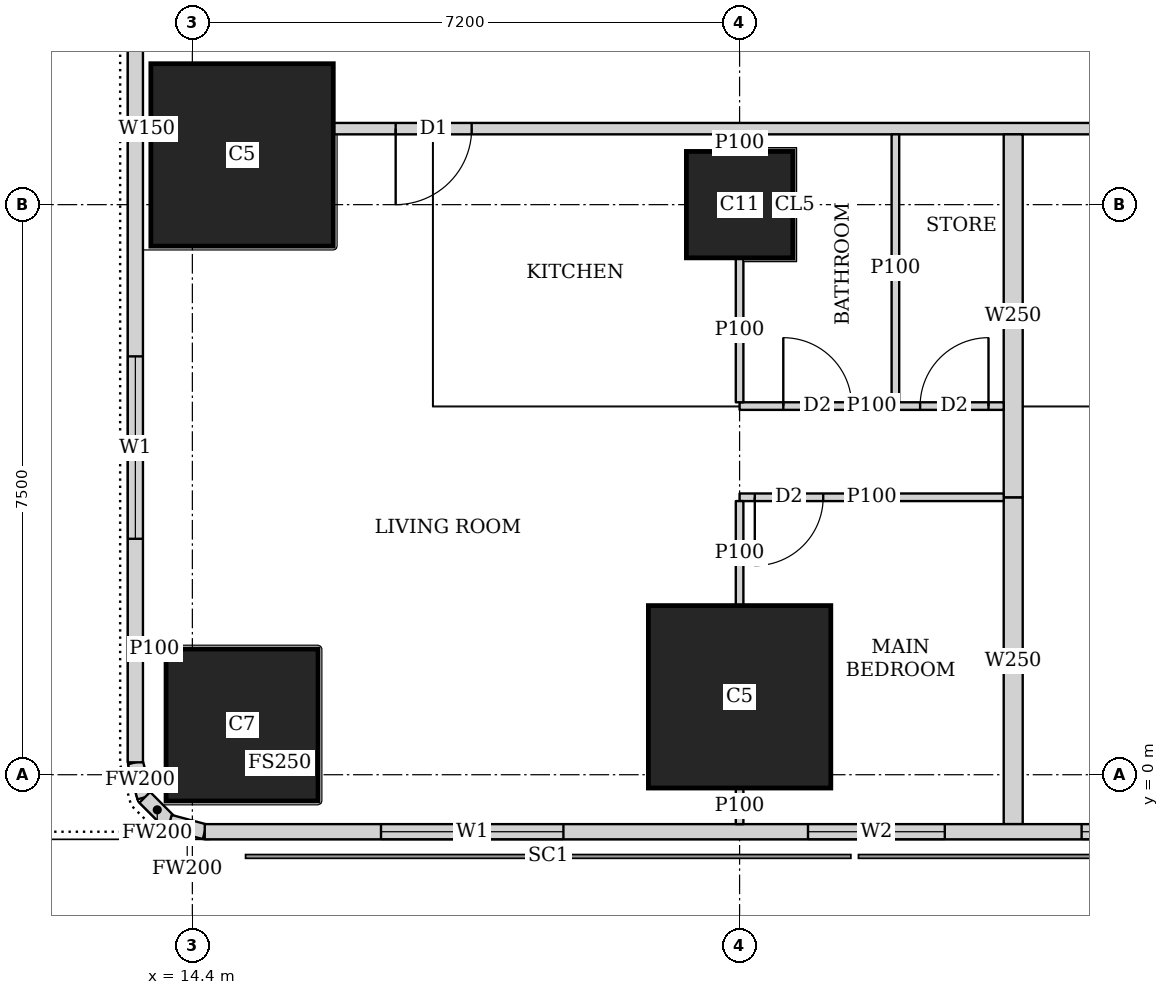
"""IFC4 building model, lengths in metres.
Left out: names, types, materials, properties, quantities, classifications, styles, units other than length and angle.
Written with IfcOpenShell. Run it as: python <this file> out.ifc"""

import sys

from ifc_helpers import new_model, si_unit, direction, frame, frame_2d, origin, origin_2d, place, context, subcontext, project, spatial, rectangle, extrude, element, fill, save


model = new_model("IFC4")
c1 = context("Model", 3, precision=1e-05, world=origin(), true_north=direction((0.0, 1.0)))
c2 = subcontext(c1, "Body", "Model", "MODEL_VIEW")
j1 = project(units=[si_unit("LENGTHUNIT", "METRE"), si_unit("PLANEANGLEUNIT", "RADIAN")], contexts=[c1])
p1 = place(None, origin())
s1 = spatial("IfcSite", under=j1, at=p1, CompositionType="ELEMENT")
p2 = place(p1, origin())
s2 = spatial("IfcBuilding", under=s1, at=p2, CompositionType="ELEMENT")
p3 = place(p2, frame((0.0, 0.0, 223.7)))
s3 = spatial("IfcBuildingStorey", under=s2, at=p3, CompositionType="ELEMENT", Elevation=223.7)
p4 = place(p3, frame((15.054, 0.654, 0.0), z_axis=(0.0, 0.0, 1.0), x_axis=(1.0, 0.0, 0.0)))
e1 = element("IfcColumn", 1, at=p4, inside=s3, PredefinedType="COLUMN", context=c2, shape_type="SweptSolid", body=[
    extrude(rectangle(XDim=2.0, YDim=2.0, at=origin_2d()), origin(), (0.0, 0.0, 1.0), 3.75),
])
for number, where, z_axis, x_axis in (
    (2, (21.6, 1.025, 0.0), (0.0, 0.0, 1.0), (1.0, 0.0, 0.0)),
    (3, (15.054, 8.154, 0.0), (0.0, 0.0, 1.0), (1.0, 0.0, 0.0)),
):
    element("IfcColumn", number, at=place(p3, frame(where, z_axis=z_axis, x_axis=x_axis)), inside=s3, PredefinedType="COLUMN", context=c2, shape_type="SweptSolid", body=[
        extrude(rectangle(XDim=2.4, YDim=2.4, at=origin_2d()), origin(), (0.0, 0.0, 1.0), 3.75),
    ])
p5 = place(p3, frame((21.6, 7.5, 0.0), z_axis=(0.0, 0.0, 1.0), x_axis=(1.0, 0.0, 0.0)))
e4 = element("IfcColumn", 4, at=p5, inside=s3, PredefinedType="COLUMN", context=c2, shape_type="SweptSolid", body=[
    extrude(rectangle(XDim=1.4, YDim=1.4, at=origin_2d()), origin(), (0.0, 0.0, 1.0), 3.75),
])
p6 = place(p3, frame((14.563, -0.75, 0.0), z_axis=(0.0, 0.0, 1.0), x_axis=(1.0, 0.0, 0.0)))
e5 = element("IfcWall", 5, at=p6, inside=s3, PredefinedType="SOLIDWALL", context=c2, shape_type="SweptSolid", body=[
    extrude(rectangle(XDim=33.228, YDim=0.2, at=frame_2d((16.614, 0.0))), origin(), (0.0, 0.0, 1.0), 3.5),
])
p7 = place(p6, frame((2.319, 0.0, 0.9)))
e6 = element("IfcOpeningElement", 6, at=p7, cuts=e5, PredefinedType="OPENING", context=c2, shape_type="SweptSolid", body=[
    extrude(rectangle(XDim=2.4, YDim=1.5, at=frame_2d((1.2, 0.75))), frame((0.0, 0.11, 0.0), z_axis=(0.0, -1.0, 0.0), x_axis=(1.0, 0.0, 0.0)), (0.0, 0.0, 1.0), 0.22),
])
p8 = place(p6, frame((7.937, 0.0, 0.9)))
e7 = element("IfcOpeningElement", 7, at=p8, cuts=e5, PredefinedType="OPENING", context=c2, shape_type="SweptSolid", body=[
    extrude(rectangle(XDim=1.8, YDim=1.5, at=frame_2d((0.9, 0.75))), frame((0.0, 0.11, 0.0), z_axis=(0.0, -1.0, 0.0), x_axis=(1.0, 0.0, 0.0)), (0.0, 0.0, 1.0), 0.22),
])
p9 = place(p6, frame((11.537, 0.0, 0.9)))
e8 = element("IfcOpeningElement", 8, at=p9, cuts=e5, PredefinedType="OPENING", context=c2, shape_type="SweptSolid", body=[
    extrude(rectangle(XDim=1.8, YDim=1.5, at=frame_2d((0.9, 0.75))), frame((0.0, 0.11, 0.0), z_axis=(0.0, -1.0, 0.0), x_axis=(1.0, 0.0, 0.0)), (0.0, 0.0, 1.0), 0.22),
])
p10 = place(p6, frame((15.137, 0.0, 0.9)))
e9 = element("IfcOpeningElement", 9, at=p10, cuts=e5, PredefinedType="OPENING", context=c2, shape_type="SweptSolid", body=[
    extrude(rectangle(XDim=1.8, YDim=1.5, at=frame_2d((0.9, 0.75))), frame((0.0, 0.11, 0.0), z_axis=(0.0, -1.0, 0.0), x_axis=(1.0, 0.0, 0.0)), (0.0, 0.0, 1.0), 0.22),
])
p11 = place(p6, frame((18.737, 0.0, 0.9)))
e10 = element("IfcOpeningElement", 10, at=p11, cuts=e5, PredefinedType="OPENING", context=c2, shape_type="SweptSolid", body=[
    extrude(rectangle(XDim=1.8, YDim=1.5, at=frame_2d((0.9, 0.75))), frame((0.0, 0.11, 0.0), z_axis=(0.0, -1.0, 0.0), x_axis=(1.0, 0.0, 0.0)), (0.0, 0.0, 1.0), 0.22),
])
p12 = place(p6, frame((22.337, 0.0, 0.9)))
e11 = element("IfcOpeningElement", 11, at=p12, cuts=e5, PredefinedType="OPENING", context=c2, shape_type="SweptSolid", body=[
    extrude(rectangle(XDim=1.8, YDim=1.5, at=frame_2d((0.9, 0.75))), frame((0.0, 0.11, 0.0), z_axis=(0.0, -1.0, 0.0), x_axis=(1.0, 0.0, 0.0)), (0.0, 0.0, 1.0), 0.22),
])
p13 = place(p3, frame((13.65, 44.837, 0.0), z_axis=(0.0, 0.0, 1.0), x_axis=(0.0, -1.0, 0.0)))
e12 = element("IfcWall", 12, at=p13, inside=s3, PredefinedType="SOLIDWALL", context=c2, shape_type="SweptSolid", body=[
    extrude(rectangle(XDim=44.674, YDim=0.2, at=frame_2d((22.337, 0.0))), origin(), (0.0, 0.0, 1.0), 3.5),
])
p14 = place(p13, frame((2.614, 0.0, 0.9)))
e13 = element("IfcOpeningElement", 13, at=p14, cuts=e12, PredefinedType="OPENING", context=c2, shape_type="SweptSolid", body=[
    extrude(rectangle(XDim=2.4, YDim=1.5, at=frame_2d((1.2, 0.75))), frame((0.0, 0.11, 0.0), z_axis=(0.0, -1.0, 0.0), x_axis=(1.0, 0.0, 0.0)), (0.0, 0.0, 1.0), 0.22),
])
p15 = place(p13, frame((39.333, 0.0, 0.9)))
e14 = element("IfcOpeningElement", 14, at=p15, cuts=e12, PredefinedType="OPENING", context=c2, shape_type="SweptSolid", body=[
    extrude(rectangle(XDim=2.4, YDim=1.5, at=frame_2d((1.2, 0.75))), frame((0.0, 0.11, 0.0), z_axis=(0.0, -1.0, 0.0), x_axis=(1.0, 0.0, 0.0)), (0.0, 0.0, 1.0), 0.22),
])
p16 = place(p13, frame((33.087, 0.0, 0.0)))
e15 = element("IfcOpeningElement", 15, at=p16, cuts=e12, PredefinedType="OPENING", context=c2, shape_type="SweptSolid", body=[
    extrude(rectangle(XDim=1.0, YDim=2.4, at=frame_2d((0.5, 1.2))), frame((0.0, 0.11, 0.0), z_axis=(0.0, -1.0, 0.0), x_axis=(1.0, 0.0, 0.0)), (0.0, 0.0, 1.0), 0.22),
])
p17 = place(p13, frame((10.587, 0.0, 0.0)))
e16 = element("IfcOpeningElement", 16, at=p17, cuts=e12, PredefinedType="OPENING", context=c2, shape_type="SweptSolid", body=[
    extrude(rectangle(XDim=1.0, YDim=2.4, at=frame_2d((0.5, 1.2))), frame((0.0, 0.11, 0.0), z_axis=(0.0, -1.0, 0.0), x_axis=(1.0, 0.0, 0.0)), (0.0, 0.0, 1.0), 0.22),
])
p18 = place(p3, frame((13.65, 0.163, 0.0), z_axis=(0.0, 0.0, 1.0), x_axis=(0.259698463175, -0.965689757751, 0.0)))
e17 = element("IfcWall", 17, at=p18, inside=s3, PredefinedType="SOLIDWALL", context=c2, shape_type="SweptSolid", body=[
    extrude(rectangle(XDim=0.478, YDim=0.2, at=frame_2d((0.239, 0.0))), origin(), (0.0, 0.0, 1.0), 3.5),
])
p19 = place(p3, frame((13.774, -0.298, 0.0), z_axis=(0.0, 0.0, 1.0), x_axis=(0.707369890659, -0.706843573776, 0.0)))
e18 = element("IfcWall", 18, at=p19, inside=s3, PredefinedType="SOLIDWALL", context=c2, shape_type="SweptSolid", body=[
    extrude(rectangle(XDim=0.464, YDim=0.2, at=frame_2d((0.232, 0.0))), origin(), (0.0, 0.0, 1.0), 3.5),
])
p20 = place(p3, frame((14.102, -0.626, 0.0), z_axis=(0.0, 0.0, 1.0), x_axis=(0.965655254015, -0.259826731483, 0.0)))
e19 = element("IfcWall", 19, at=p20, inside=s3, PredefinedType="SOLIDWALL", context=c2, shape_type="SweptSolid", body=[
    extrude(rectangle(XDim=0.477, YDim=0.2, at=frame_2d((0.239, 0.0))), origin(), (0.0, 0.0, 1.0), 3.5),
])
p21 = place(p3, frame((40.053, 8.5, 0.0), z_axis=(0.0, 0.0, 1.0), x_axis=(-1.0, 0.0, 0.0)))
e20 = element("IfcWall", 20, at=p21, inside=s3, PredefinedType="SOLIDWALL", context=c2, shape_type="SweptSolid", body=[
    extrude(rectangle(XDim=23.798, YDim=0.15, at=frame_2d((11.899, 0.0))), origin(), (0.0, 0.0, 1.0), 3.5),
])
p22 = place(p21, frame((21.978, 0.0, 0.0)))
e21 = element("IfcOpeningElement", 21, at=p22, cuts=e20, PredefinedType="OPENING", context=c2, shape_type="SweptSolid", body=[
    extrude(rectangle(XDim=1.0, YDim=2.1, at=frame_2d((0.5, 1.05))), frame((0.0, 0.085, 0.0), z_axis=(0.0, -1.0, 0.0), x_axis=(1.0, 0.0, 0.0)), (0.0, 0.0, 1.0), 0.17),
])
p23 = place(p21, frame((12.753, 0.0, 0.0)))
e22 = element("IfcOpeningElement", 22, at=p23, cuts=e20, PredefinedType="OPENING", context=c2, shape_type="SweptSolid", body=[
    extrude(rectangle(XDim=1.0, YDim=2.1, at=frame_2d((0.5, 1.05))), frame((0.0, 0.085, 0.0), z_axis=(0.0, -1.0, 0.0), x_axis=(1.0, 0.0, 0.0)), (0.0, 0.0, 1.0), 0.17),
])
p24 = place(p21, frame((0.15, 0.0, 0.0)))
e23 = element("IfcOpeningElement", 23, at=p24, cuts=e20, PredefinedType="OPENING", context=c2, shape_type="SweptSolid", body=[
    extrude(rectangle(XDim=1.0, YDim=2.1, at=frame_2d((0.5, 1.05))), frame((0.0, 0.085, 0.0), z_axis=(0.0, -1.0, 0.0), x_axis=(1.0, 0.0, 0.0)), (0.0, 0.0, 1.0), 0.17),
])
p25 = place(p3, frame((13.853, 8.5, 0.0), z_axis=(0.0, 0.0, 1.0), x_axis=(-1.0, 0.0, 0.0)))
e24 = element("IfcWall", 24, at=p25, inside=s3, PredefinedType="SOLIDWALL", context=c2, shape_type="SweptSolid", body=[
    extrude(rectangle(XDim=0.103, YDim=0.15, at=frame_2d((0.052, 0.0))), origin(), (0.0, 0.0, 1.0), 3.5),
])
p26 = place(p3, frame((13.75, 1.654, 0.0), z_axis=(0.0, 0.0, 1.0), x_axis=(1.0, 0.0, 0.0)))
e25 = element("IfcWall", 25, at=p26, inside=s3, PredefinedType="PARTITIONING", context=c2, shape_type="SweptSolid", body=[
    extrude(rectangle(XDim=0.304, YDim=0.1, at=frame_2d((0.152, 0.0))), origin(), (0.0, 0.0, 1.0), 2.05),
])
p27 = place(p3, frame((25.075, 3.65, 0.0), z_axis=(0.0, 0.0, 1.0), x_axis=(-1.0, 0.0, 0.0)))
e26 = element("IfcWall", 26, at=p27, inside=s3, PredefinedType="PARTITIONING", context=c2, shape_type="SweptSolid", body=[
    extrude(rectangle(XDim=3.475, YDim=0.1, at=frame_2d((1.737, 0.0))), origin(), (0.0, 0.0, 1.0), 3.5),
])
p28 = place(p27, frame((2.375, 0.0, 0.0)))
e27 = element("IfcOpeningElement", 27, at=p28, cuts=e26, PredefinedType="OPENING", context=c2, shape_type="SweptSolid", body=[
    extrude(rectangle(XDim=0.9, YDim=2.1, at=frame_2d((0.45, 1.05))), frame((0.0, 0.06, 0.0), z_axis=(0.0, -1.0, 0.0), x_axis=(1.0, 0.0, 0.0)), (0.0, 0.0, 1.0), 0.12),
])
p29 = place(p3, frame((25.075, 4.85, 0.0), z_axis=(0.0, 0.0, 1.0), x_axis=(-1.0, 0.0, 0.0)))
e28 = element("IfcWall", 28, at=p29, inside=s3, PredefinedType="PARTITIONING", context=c2, shape_type="SweptSolid", body=[
    extrude(rectangle(XDim=3.475, YDim=0.1, at=frame_2d((1.737, 0.0))), origin(), (0.0, 0.0, 1.0), 3.5),
])
p30 = place(p29, frame((2.0, 0.0, 0.0)))
e29 = element("IfcOpeningElement", 29, at=p30, cuts=e28, PredefinedType="OPENING", context=c2, shape_type="SweptSolid", body=[
    extrude(rectangle(XDim=0.9, YDim=2.1, at=frame_2d((0.45, 1.05))), frame((0.0, 0.06, 0.0), z_axis=(0.0, -1.0, 0.0), x_axis=(1.0, 0.0, 0.0)), (0.0, 0.0, 1.0), 0.12),
])
p31 = place(p29, frame((0.2, 0.0, 0.0)))
e30 = element("IfcOpeningElement", 30, at=p31, cuts=e28, PredefinedType="OPENING", context=c2, shape_type="SweptSolid", body=[
    extrude(rectangle(XDim=0.9, YDim=2.1, at=frame_2d((0.45, 1.05))), frame((0.0, 0.06, 0.0), z_axis=(0.0, -1.0, 0.0), x_axis=(1.0, 0.0, 0.0)), (0.0, 0.0, 1.0), 0.12),
])
p32 = place(p3, frame((21.6, -0.65, 0.0), z_axis=(0.0, 0.0, 1.0), x_axis=(0.0, 1.0, 0.0)))
e31 = element("IfcWall", 31, at=p32, inside=s3, PredefinedType="PARTITIONING", context=c2, shape_type="SweptSolid", body=[
    extrude(rectangle(XDim=0.474, YDim=0.1, at=frame_2d((0.237, 0.0))), origin(), (0.0, 0.0, 1.0), 3.5),
])
p33 = place(p3, frame((21.6, 2.226, 0.0), z_axis=(0.0, 0.0, 1.0), x_axis=(0.0, 1.0, 0.0)))
e32 = element("IfcWall", 32, at=p33, inside=s3, PredefinedType="PARTITIONING", context=c2, shape_type="SweptSolid", body=[
    extrude(rectangle(XDim=1.374, YDim=0.1, at=frame_2d((0.687, 0.0))), origin(), (0.0, 0.0, 1.0), 3.5),
])
p34 = place(p3, frame((21.6, 4.9, 0.0), z_axis=(0.0, 0.0, 1.0), x_axis=(0.0, 1.0, 0.0)))
e33 = element("IfcWall", 33, at=p34, inside=s3, PredefinedType="PARTITIONING", context=c2, shape_type="SweptSolid", body=[
    extrude(rectangle(XDim=1.899, YDim=0.1, at=frame_2d((0.95, 0.0))), origin(), (0.0, 0.0, 1.0), 3.5),
])
p35 = place(p3, frame((21.6, 8.201, 0.0), z_axis=(0.0, 0.0, 1.0), x_axis=(0.0, 1.0, 0.0)))
e34 = element("IfcWall", 34, at=p35, inside=s3, PredefinedType="PARTITIONING", context=c2, shape_type="SweptSolid", body=[
    extrude(rectangle(XDim=0.224, YDim=0.1, at=frame_2d((0.112, 0.0))), origin(), (0.0, 0.0, 1.0), 3.5),
])
p36 = place(p3, frame((23.65, 4.9, 0.0), z_axis=(0.0, 0.0, 1.0), x_axis=(0.0, 1.0, 0.0)))
e35 = element("IfcWall", 35, at=p36, inside=s3, PredefinedType="PARTITIONING", context=c2, shape_type="SweptSolid", body=[
    extrude(rectangle(XDim=3.525, YDim=0.1, at=frame_2d((1.763, 0.0))), origin(), (0.0, 0.0, 1.0), 3.5),
])
p37 = place(p3, frame((25.2, -0.65, 0.0), z_axis=(0.0, 0.0, 1.0), x_axis=(0.0, 1.0, 0.0)))
e36 = element("IfcWall", 36, at=p37, inside=s3, PredefinedType="SOLIDWALL", context=c2, shape_type="SweptSolid", body=[
    extrude(rectangle(XDim=4.3, YDim=0.25, at=frame_2d((2.15, 0.0))), origin(), (0.0, 0.0, 1.0), 2.05),
])
p38 = place(p3, frame((25.2, 3.65, 0.0), z_axis=(0.0, 0.0, 1.0), x_axis=(0.0, 1.0, 0.0)))
e37 = element("IfcWall", 37, at=p38, inside=s3, PredefinedType="SOLIDWALL", context=c2, shape_type="SweptSolid", body=[
    extrude(rectangle(XDim=4.775, YDim=0.25, at=frame_2d((2.388, 0.0))), origin(), (0.0, 0.0, 1.0), 3.5),
])
p39 = place(p7, origin())
e38 = element("IfcWindow", 38, at=p39, inside=s3, PartitioningType="SINGLE_PANEL", PredefinedType="WINDOW", context=c2, shape_type="SweptSolid", body=[
    extrude(rectangle(XDim=2.4, YDim=1.5, at=frame_2d((1.2, 0.75))), frame((0.0, 0.03, 0.0), z_axis=(0.0, -1.0, 0.0), x_axis=(1.0, 0.0, 0.0)), (0.0, 0.0, 1.0), 0.06),
])
fill(e6, e38)
p40 = place(p8, origin())
e39 = element("IfcWindow", 39, at=p40, inside=s3, PartitioningType="SINGLE_PANEL", PredefinedType="WINDOW", context=c2, shape_type="SweptSolid", body=[
    extrude(rectangle(XDim=1.8, YDim=1.5, at=frame_2d((0.9, 0.75))), frame((0.0, 0.03, 0.0), z_axis=(0.0, -1.0, 0.0), x_axis=(1.0, 0.0, 0.0)), (0.0, 0.0, 1.0), 0.06),
])
fill(e7, e39)
p41 = place(p9, origin())
e40 = element("IfcWindow", 40, at=p41, inside=s3, PartitioningType="SINGLE_PANEL", PredefinedType="WINDOW", context=c2, shape_type="SweptSolid", body=[
    extrude(rectangle(XDim=1.8, YDim=1.5, at=frame_2d((0.9, 0.75))), frame((0.0, 0.03, 0.0), z_axis=(0.0, -1.0, 0.0), x_axis=(1.0, 0.0, 0.0)), (0.0, 0.0, 1.0), 0.06),
])
fill(e8, e40)
p42 = place(p15, origin())
e41 = element("IfcWindow", 41, at=p42, inside=s3, PartitioningType="SINGLE_PANEL", PredefinedType="WINDOW", context=c2, shape_type="SweptSolid", body=[
    extrude(rectangle(XDim=2.4, YDim=1.5, at=frame_2d((1.2, 0.75))), frame((0.0, 0.03, 0.0), z_axis=(0.0, -1.0, 0.0), x_axis=(1.0, 0.0, 0.0)), (0.0, 0.0, 1.0), 0.06),
])
fill(e14, e41)
p43 = place(p28, origin())
e42 = element("IfcDoor", 42, at=p43, inside=s3, OperationType="SINGLE_SWING_RIGHT", PredefinedType="DOOR", context=c2, shape_type="SweptSolid", body=[
    extrude(rectangle(XDim=0.9, YDim=2.1, at=frame_2d((0.45, 1.05))), frame((0.0, 0.025, 0.0), z_axis=(0.0, -1.0, 0.0), x_axis=(1.0, 0.0, 0.0)), (0.0, 0.0, 1.0), 0.05),
])
fill(e27, e42)
p44 = place(p30, origin())
e43 = element("IfcDoor", 43, at=p44, inside=s3, OperationType="SINGLE_SWING_LEFT", PredefinedType="DOOR", context=c2, shape_type="SweptSolid", body=[
    extrude(rectangle(XDim=0.9, YDim=2.1, at=frame_2d((0.45, 1.05))), frame((0.0, 0.025, 0.0), z_axis=(0.0, -1.0, 0.0), x_axis=(1.0, 0.0, 0.0)), (0.0, 0.0, 1.0), 0.05),
])
fill(e29, e43)
p45 = place(p31, origin())
e44 = element("IfcDoor", 44, at=p45, inside=s3, OperationType="SINGLE_SWING_RIGHT", PredefinedType="DOOR", context=c2, shape_type="SweptSolid", body=[
    extrude(rectangle(XDim=0.9, YDim=2.1, at=frame_2d((0.45, 1.05))), frame((0.0, 0.025, 0.0), z_axis=(0.0, -1.0, 0.0), x_axis=(1.0, 0.0, 0.0)), (0.0, 0.0, 1.0), 0.05),
])
fill(e30, e44)
p46 = place(p22, origin())
e45 = element("IfcDoor", 45, at=p46, inside=s3, OperationType="SINGLE_SWING_RIGHT", PredefinedType="DOOR", context=c2, shape_type="SweptSolid", body=[
    extrude(rectangle(XDim=1.0, YDim=2.1, at=frame_2d((0.5, 1.05))), frame((0.0, 0.025, 0.0), z_axis=(0.0, -1.0, 0.0), x_axis=(1.0, 0.0, 0.0)), (0.0, 0.0, 1.0), 0.05),
])
fill(e21, e45)
save(model, sys.argv[1])
